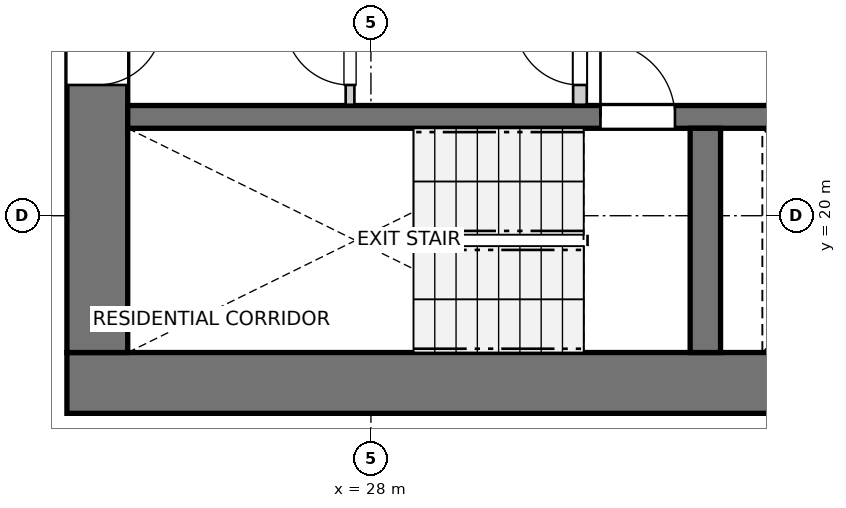
"""IFC4 building model, lengths in metres.
Left out: names, types, materials, properties, quantities, classifications, styles, units other than length and angle.
Written with IfcOpenShell. Run it as: python <this file> out.ifc"""

import sys

from ifc_helpers import new_model, si_unit, direction, frame, frame_2d, origin, place, context, subcontext, project, spatial, rectangle, extrude, source, transform, mapped, element, fill, save


model = new_model("IFC4")
c1 = context("Model", 3, precision=1e-05, world=origin(), true_north=direction((0.0, 1.0)))
c2 = subcontext(c1, "Body", "Model", "MODEL_VIEW")
j1 = project(units=[si_unit("LENGTHUNIT", "METRE"), si_unit("PLANEANGLEUNIT", "RADIAN")], contexts=[c1])
p1 = place(None, origin())
s1 = spatial("IfcSite", under=j1, at=p1, CompositionType="ELEMENT")
p2 = place(p1, origin())
s2 = spatial("IfcBuilding", under=s1, at=p2, CompositionType="ELEMENT")
p3 = place(p2, frame((0.0, 0.0, 17.4)))
s3 = spatial("IfcBuildingStorey", under=s2, at=p3, CompositionType="ELEMENT", Elevation=17.4)
p4 = place(p3, frame((24.0, 17.8, 0.0), z_axis=(0.0, 0.0, 1.0), x_axis=(1.0, 0.0, 0.0)))
e1 = element("IfcWall", 1, at=p4, inside=s3, PredefinedType="SHEAR", context=c2, shape_type="SweptSolid", body=[
    extrude(rectangle(XDim=12.7, YDim=0.8, at=frame_2d((6.35, 0.0))), origin(), (0.0, 0.0, 1.0), 2.94),
])
p5 = place(p3, frame((24.4, 33.8, 0.0), z_axis=(0.0, 0.0, 1.0), x_axis=(0.0, -1.0, 0.0)))
e2 = element("IfcWall", 2, at=p5, inside=s3, PredefinedType="SHEAR", context=c2, shape_type="SweptSolid", body=[
    extrude(rectangle(XDim=15.6, YDim=0.8, at=frame_2d((7.8, 0.0))), origin(), (0.0, 0.0, 1.0), 2.94),
])
p6 = place(p5, frame((7.05, 0.0, 0.0)))
e3 = element("IfcOpeningElement", 3, at=p6, cuts=e2, PredefinedType="OPENING", context=c2, shape_type="SweptSolid", body=[
    extrude(rectangle(XDim=1.5, YDim=2.15, at=frame_2d((0.75, 1.075))), frame((0.0, 0.41, 0.0), z_axis=(0.0, -1.0, 0.0), x_axis=(1.0, 0.0, 0.0)), (0.0, 0.0, 1.0), 0.82),
])
p7 = place(p5, frame((3.52, 0.0, 0.0)))
e4 = element("IfcOpeningElement", 4, at=p7, cuts=e2, PredefinedType="OPENING", context=c2, shape_type="SweptSolid", body=[
    extrude(rectangle(XDim=0.86, YDim=2.05, at=frame_2d((0.43, 1.025))), frame((0.0, 0.41, 0.0), z_axis=(0.0, -1.0, 0.0), x_axis=(1.0, 0.0, 0.0)), (0.0, 0.0, 1.0), 0.82),
])
p8 = place(p5, frame((11.22, 0.0, 0.0)))
e5 = element("IfcOpeningElement", 5, at=p8, cuts=e2, PredefinedType="OPENING", context=c2, shape_type="SweptSolid", body=[
    extrude(rectangle(XDim=0.86, YDim=2.05, at=frame_2d((0.43, 1.025))), frame((0.0, 0.41, 0.0), z_axis=(0.0, -1.0, 0.0), x_axis=(1.0, 0.0, 0.0)), (0.0, 0.0, 1.0), 0.82),
])
p9 = place(p3, frame((24.8, 21.3, 0.0), z_axis=(0.0, 0.0, 1.0), x_axis=(1.0, 0.0, 0.0)))
e6 = element("IfcWall", 6, at=p9, inside=s3, PredefinedType="SHEAR", context=c2, shape_type="SweptSolid", body=[
    extrude(rectangle(XDim=11.1, YDim=0.3, at=frame_2d((5.55, 0.0))), origin(), (0.0, 0.0, 1.0), 2.94),
])
p10 = place(p9, frame((6.22, 0.0, 0.0)))
e7 = element("IfcOpeningElement", 7, at=p10, cuts=e6, PredefinedType="OPENING", context=c2, shape_type="SweptSolid", body=[
    extrude(rectangle(XDim=0.98, YDim=2.15, at=frame_2d((0.49, 1.075))), frame((0.0, 0.16, 0.0), z_axis=(0.0, -1.0, 0.0), x_axis=(1.0, 0.0, 0.0)), (0.0, 0.0, 1.0), 0.32),
])
p11 = place(p9, frame((9.15, 0.0, 0.0)))
e8 = element("IfcOpeningElement", 8, at=p11, cuts=e6, PredefinedType="OPENING", context=c2, shape_type="SweptSolid", body=[
    extrude(rectangle(XDim=1.15, YDim=2.15, at=frame_2d((0.575, 1.075))), frame((0.0, 0.16, 0.0), z_axis=(0.0, -1.0, 0.0), x_axis=(1.0, 0.0, 0.0)), (0.0, 0.0, 1.0), 0.32),
])
p12 = place(p3, frame((32.4, 18.2, 0.0), z_axis=(0.0, 0.0, 1.0), x_axis=(0.0, 1.0, 0.0)))
e9 = element("IfcWall", 9, at=p12, inside=s3, PredefinedType="SHEAR", context=c2, shape_type="SweptSolid", body=[
    extrude(rectangle(XDim=2.95, YDim=0.4, at=frame_2d((1.475, 0.0))), origin(), (0.0, 0.0, 1.0), 2.94),
])
p13 = place(p3, frame((30.75, 21.46, 0.0), z_axis=(0.0, 0.0, 1.0), x_axis=(0.0, 1.0, 0.0)))
e10 = element("IfcWall", 10, at=p13, inside=s3, PredefinedType="PARTITIONING", context=c2, shape_type="SweptSolid", body=[
    extrude(rectangle(XDim=3.11, YDim=0.18, at=frame_2d((1.555, 0.0))), origin(), (0.0, 0.0, 1.0), 2.94),
])
p14 = place(p13, frame((0.26, 0.0, 0.0)))
e11 = element("IfcOpeningElement", 11, at=p14, cuts=e10, PredefinedType="OPENING", context=c2, shape_type="SweptSolid", body=[
    extrude(rectangle(XDim=0.86, YDim=2.05, at=frame_2d((0.43, 1.025))), frame((0.0, 0.1, 0.0), z_axis=(0.0, -1.0, 0.0), x_axis=(1.0, 0.0, 0.0)), (0.0, 0.0, 1.0), 0.2),
])
p15 = place(p3, frame((27.725, 21.46, 0.0), z_axis=(0.0, 0.0, 1.0), x_axis=(0.0, 1.0, 0.0)))
e12 = element("IfcWall", 12, at=p15, inside=s3, PredefinedType="PARTITIONING", context=c2, shape_type="SweptSolid", body=[
    extrude(rectangle(XDim=1.38, YDim=0.115, at=frame_2d((0.69, 0.0))), origin(), (0.0, 0.0, 1.0), 2.94),
])
p16 = place(p15, frame((0.26, 0.0, 0.0)))
e13 = element("IfcOpeningElement", 13, at=p16, cuts=e12, PredefinedType="OPENING", context=c2, shape_type="SweptSolid", body=[
    extrude(rectangle(XDim=0.86, YDim=2.05, at=frame_2d((0.43, 1.025))), frame((0.0, 0.067, 0.0), z_axis=(0.0, -1.0, 0.0), x_axis=(1.0, 0.0, 0.0)), (0.0, 0.0, 1.0), 0.135),
])
m1 = source(origin(), c2, "Body", "SweptSolid", [
    extrude(rectangle(XDim=0.98, YDim=2.15, at=frame_2d((0.49, 1.075))), frame((0.0, 0.025, 0.0), z_axis=(0.0, -1.0, 0.0), x_axis=(1.0, 0.0, 0.0)), (0.0, 0.0, 1.0), 0.05),
])
p17 = place(p10, origin())
e14 = element("IfcDoor", 14, at=p17, inside=s3, OperationType="SINGLE_SWING_LEFT", PredefinedType="DOOR", context=c2, shape_type="MappedRepresentation", body=[
    mapped(m1, transform((0.0, 0.0, 0.0), x_axis=(1.0, 0.0, 0.0), y_axis=(0.0, 1.0, 0.0), z_axis=(0.0, 0.0, 1.0), scale=1.0)),
])
fill(e7, e14)
m2 = source(origin(), c2, "Body", "SweptSolid", [
    extrude(rectangle(XDim=0.86, YDim=2.05, at=frame_2d((0.43, 1.025))), frame((0.0, 0.025, 0.0), z_axis=(0.0, -1.0, 0.0), x_axis=(1.0, 0.0, 0.0)), (0.0, 0.0, 1.0), 0.05),
])
p18 = place(p8, origin())
e15 = element("IfcDoor", 15, at=p18, inside=s3, OperationType="SINGLE_SWING_LEFT", PredefinedType="DOOR", context=c2, shape_type="MappedRepresentation", body=[
    mapped(m2, transform((0.0, 0.0, 0.0), x_axis=(1.0, 0.0, 0.0), y_axis=(0.0, 1.0, 0.0), z_axis=(0.0, 0.0, 1.0), scale=1.0)),
])
fill(e5, e15)
p19 = place(p14, origin())
e16 = element("IfcDoor", 16, at=p19, inside=s3, OperationType="SINGLE_SWING_RIGHT", PredefinedType="DOOR", context=c2, shape_type="MappedRepresentation", body=[
    mapped(m2, transform((0.0, 0.0, 0.0), x_axis=(1.0, 0.0, 0.0), y_axis=(0.0, 1.0, 0.0), z_axis=(0.0, 0.0, 1.0), scale=1.0)),
])
fill(e11, e16)
p20 = place(p16, origin())
e17 = element("IfcDoor", 17, at=p20, inside=s3, OperationType="SINGLE_SWING_RIGHT", PredefinedType="DOOR", context=c2, shape_type="MappedRepresentation", body=[
    mapped(m2, transform((0.0, 0.0, 0.0), x_axis=(1.0, 0.0, 0.0), y_axis=(0.0, 1.0, 0.0), z_axis=(0.0, 0.0, 1.0), scale=1.0)),
])
fill(e13, e17)
save(model, sys.argv[1])
